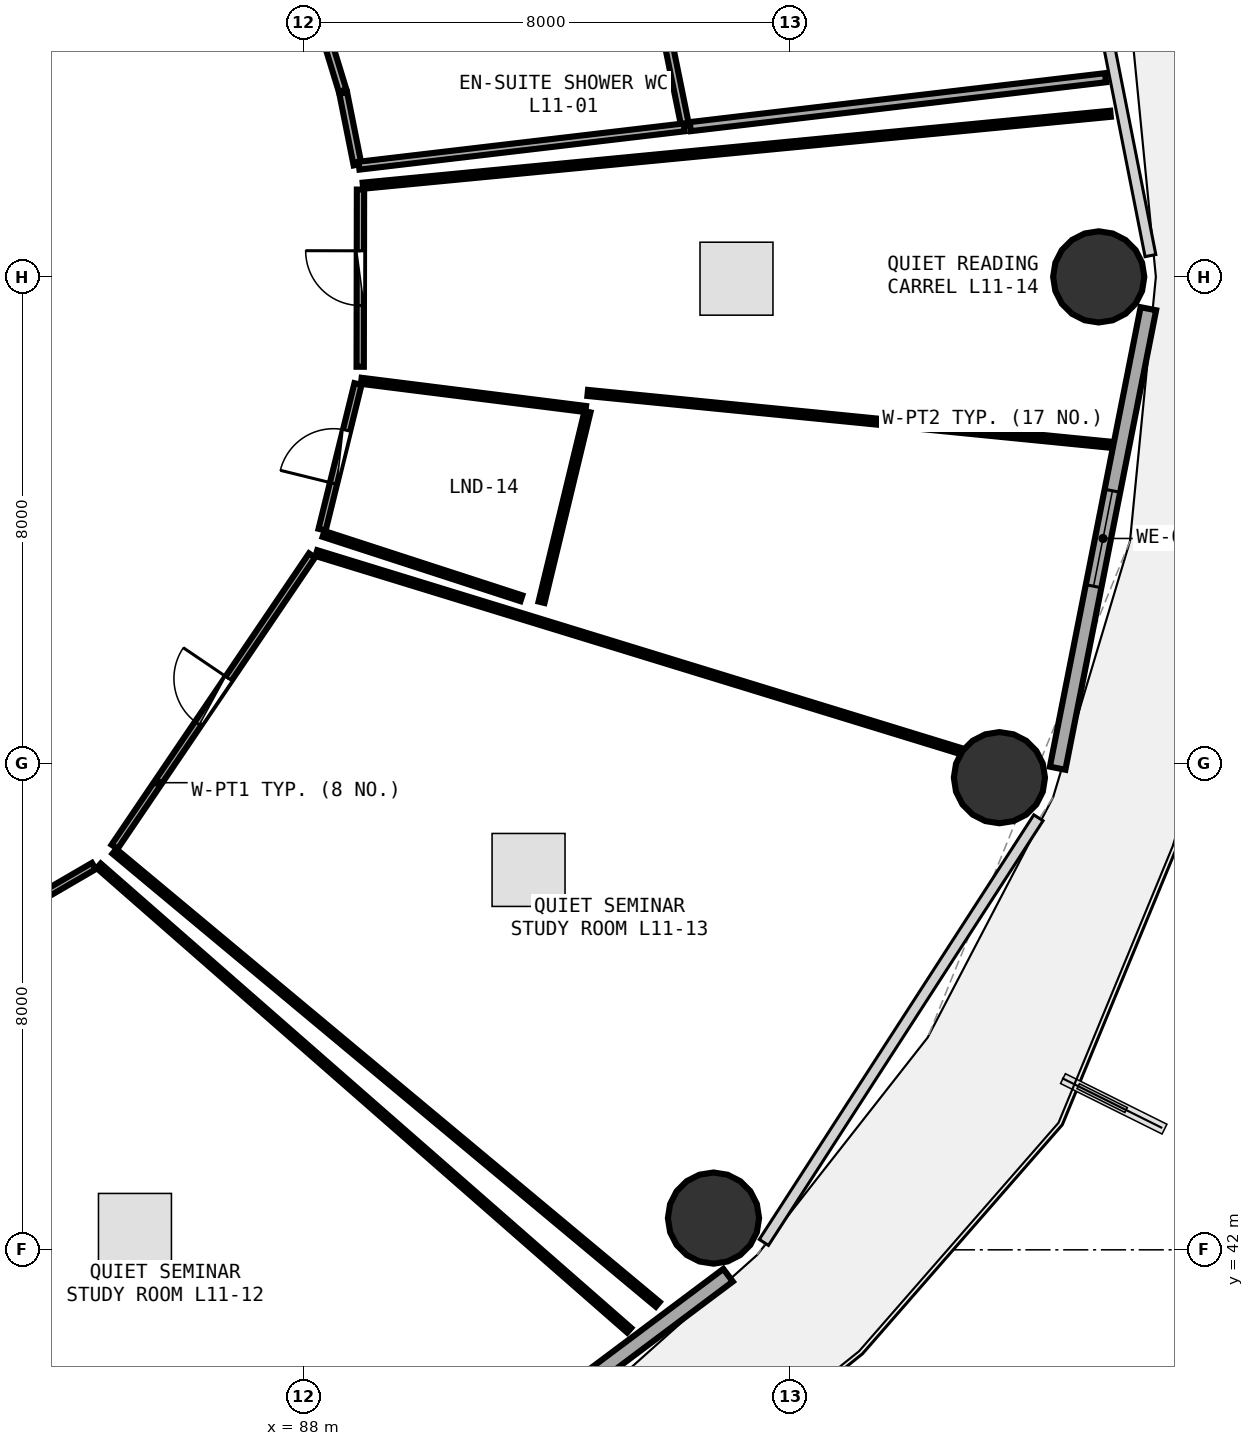
"""IFC4 building model, lengths in metres.
Left out: names, types, materials, properties, quantities, classifications, styles, units other than length and angle.
Written with IfcOpenShell. Run it as: python <this file> out.ifc"""

import sys

from ifc_helpers import new_model, si_unit, direction, frame, frame_2d, origin, origin_2d, place, context, subcontext, project, spatial, rectangle, circle, extrude, element, fill, save


model = new_model("IFC4")
c1 = context("Model", 3, precision=1e-05, world=origin(), true_north=direction((0.0, 1.0)))
c2 = subcontext(c1, "Body", "Model", "MODEL_VIEW")
j1 = project(units=[si_unit("LENGTHUNIT", "METRE"), si_unit("PLANEANGLEUNIT", "RADIAN")], contexts=[c1])
p1 = place(None, origin())
s1 = spatial("IfcSite", under=j1, at=p1, CompositionType="ELEMENT")
p2 = place(p1, origin())
s2 = spatial("IfcBuilding", under=s1, at=p2, CompositionType="ELEMENT")
p3 = place(p2, frame((0.0, 0.0, 45.0)))
s3 = spatial("IfcBuildingStorey", under=s2, at=p3, CompositionType="ELEMENT", Elevation=45.0)
for number, where, z_axis, x_axis in (
    (1, (101.08, 58.0, 0.0), (0.0, 0.0, 1.0), (1.0, 0.0, 0.0)),
    (2, (94.744, 42.522, 0.0), (0.0, 0.0, 1.0), (1.0, 0.0, 0.0)),
    (3, (99.447, 49.764, 0.0), (0.0, 0.0, 1.0), (1.0, 0.0, 0.0)),
):
    element("IfcColumn", number, at=place(p3, frame(where, z_axis=z_axis, x_axis=x_axis)), inside=s3, PredefinedType="COLUMN", context=c2, shape_type="SweptSolid", body=[
        extrude(circle(Radius=0.75, at=origin_2d()), origin(), (0.0, 0.0, 1.0), 3.75),
    ])
p4 = place(p3, frame((88.349, 36.611, 0.0), z_axis=(0.0, 0.0, 1.0), x_axis=(0.80030733173, 0.599590005569, 0.0)))
e4 = element("IfcWall", 4, at=p4, inside=s3, PredefinedType="SOLIDWALL", context=c2, shape_type="SweptSolid", body=[
    extrude(rectangle(XDim=8.291, YDim=0.26, at=frame_2d((4.145, 0.0))), origin(), (0.0, 0.0, 1.0), 3.475),
])
p5 = place(p4, frame((3.345, 0.0, 0.85)))
e5 = element("IfcOpeningElement", 5, at=p5, cuts=e4, PredefinedType="OPENING", context=c2, shape_type="SweptSolid", body=[
    extrude(rectangle(XDim=1.6, YDim=1.45, at=frame_2d((0.8, 0.725))), frame((0.0, 0.14, 0.0), z_axis=(0.0, -1.0, 0.0), x_axis=(1.0, 0.0, 0.0)), (0.0, 0.0, 1.0), 0.28),
])
p6 = place(p3, frame((100.404, 49.92, 0.0), z_axis=(0.0, 0.0, 1.0), x_axis=(0.193726159581, 0.98105564322, 0.0)))
e6 = element("IfcWall", 6, at=p6, inside=s3, PredefinedType="SOLIDWALL", context=c2, shape_type="SweptSolid", body=[
    extrude(rectangle(XDim=7.703, YDim=0.26, at=frame_2d((3.851, 0.0))), origin(), (0.0, 0.0, 1.0), 3.475),
])
p7 = place(p6, frame((3.051, 0.0, 0.85)))
e7 = element("IfcOpeningElement", 7, at=p7, cuts=e6, PredefinedType="OPENING", context=c2, shape_type="SweptSolid", body=[
    extrude(rectangle(XDim=1.6, YDim=1.45, at=frame_2d((0.8, 0.725))), frame((0.0, 0.14, 0.0), z_axis=(0.0, -1.0, 0.0), x_axis=(1.0, 0.0, 0.0)), (0.0, 0.0, 1.0), 0.28),
])
p8 = place(p3, frame((79.33, 45.268, 0.0), z_axis=(0.0, 0.0, 1.0), x_axis=(0.864061520755, 0.503386221852, 0.0)))
e8 = element("IfcWall", 8, at=p8, inside=s3, PredefinedType="PARTITIONING", context=c2, shape_type="SweptSolid", body=[
    extrude(rectangle(XDim=6.044, YDim=0.12, at=frame_2d((3.022, 0.0))), origin(), (0.0, 0.0, 1.0), 2.875),
])
p9 = place(p8, frame((2.572, 0.0, 0.0)))
e9 = element("IfcOpeningElement", 9, at=p9, cuts=e8, PredefinedType="OPENING", context=c2, shape_type="SweptSolid", body=[
    extrude(rectangle(XDim=0.9, YDim=2.08, at=frame_2d((0.45, 1.04))), frame((0.0, 0.07, 0.0), z_axis=(0.0, -1.0, 0.0), x_axis=(1.0, 0.0, 0.0)), (0.0, 0.0, 1.0), 0.14),
])
p10 = place(p3, frame((84.895, 48.628, 0.0), z_axis=(0.0, 0.0, 1.0), x_axis=(0.560933949984, 0.827860558159, 0.0)))
e10 = element("IfcWall", 10, at=p10, inside=s3, PredefinedType="PARTITIONING", context=c2, shape_type="SweptSolid", body=[
    extrude(rectangle(XDim=5.788, YDim=0.12, at=frame_2d((2.894, 0.0))), origin(), (0.0, 0.0, 1.0), 2.875),
])
p11 = place(p10, frame((2.444, 0.0, 0.0)))
e11 = element("IfcOpeningElement", 11, at=p11, cuts=e10, PredefinedType="OPENING", context=c2, shape_type="SweptSolid", body=[
    extrude(rectangle(XDim=0.9, YDim=2.08, at=frame_2d((0.45, 1.04))), frame((0.0, 0.07, 0.0), z_axis=(0.0, -1.0, 0.0), x_axis=(1.0, 0.0, 0.0)), (0.0, 0.0, 1.0), 0.14),
])
p12 = place(p3, frame((88.307, 53.843, 0.0), z_axis=(0.0, 0.0, 1.0), x_axis=(0.239366536705, 0.970929277088, 0.0)))
e12 = element("IfcWall", 12, at=p12, inside=s3, PredefinedType="PARTITIONING", context=c2, shape_type="SweptSolid", body=[
    extrude(rectangle(XDim=2.466, YDim=0.12, at=frame_2d((1.233, 0.0))), origin(), (0.0, 0.0, 1.0), 3.48),
])
p13 = place(p12, frame((0.783, 0.0, 0.0)))
e13 = element("IfcOpeningElement", 13, at=p13, cuts=e12, PredefinedType="OPENING", context=c2, shape_type="SweptSolid", body=[
    extrude(rectangle(XDim=0.9, YDim=2.08, at=frame_2d((0.45, 1.04))), frame((0.0, 0.07, 0.0), z_axis=(0.0, -1.0, 0.0), x_axis=(1.0, 0.0, 0.0)), (0.0, 0.0, 1.0), 0.14),
])
p14 = place(p3, frame((88.934, 56.522, 0.0), z_axis=(0.0, 0.0, 1.0), x_axis=(0.001675600865, 0.99999859618, 0.0)))
e14 = element("IfcWall", 14, at=p14, inside=s3, PredefinedType="PARTITIONING", context=c2, shape_type="SweptSolid", body=[
    extrude(rectangle(XDim=2.914, YDim=0.12, at=frame_2d((1.457, 0.0))), origin(), (0.0, 0.0, 1.0), 2.875),
])
p15 = place(p14, frame((1.007, 0.0, 0.0)))
e15 = element("IfcOpeningElement", 15, at=p15, cuts=e14, PredefinedType="OPENING", context=c2, shape_type="SweptSolid", body=[
    extrude(rectangle(XDim=0.9, YDim=2.08, at=frame_2d((0.45, 1.04))), frame((0.0, 0.07, 0.0), z_axis=(0.0, -1.0, 0.0), x_axis=(1.0, 0.0, 0.0)), (0.0, 0.0, 1.0), 0.14),
])
p16 = place(p3, frame((88.89, 59.846, 0.0), z_axis=(0.0, 0.0, 1.0), x_axis=(-0.195959765133, 0.980611936726, 0.0)))
e16 = element("IfcWall", 16, at=p16, inside=s3, PredefinedType="PLUMBINGWALL", context=c2, shape_type="SweptSolid", body=[
    extrude(rectangle(XDim=1.201, YDim=0.13, at=frame_2d((0.601, 0.0))), origin(), (0.0, 0.0, 1.0), 3.48),
])
p17 = place(p3, frame((88.645, 61.062, 0.0), z_axis=(0.0, 0.0, 1.0), x_axis=(-0.292804953119, 0.956172191307, 0.0)))
e17 = element("IfcWall", 17, at=p17, inside=s3, PredefinedType="PLUMBINGWALL", context=c2, shape_type="SweptSolid", body=[
    extrude(rectangle(XDim=1.206, YDim=0.13, at=frame_2d((0.603, 0.0))), origin(), (0.0, 0.0, 1.0), 3.48),
])
p18 = place(p3, frame((93.955, 62.079, 0.0), z_axis=(0.0, 0.0, 1.0), x_axis=(0.198619685617, -0.980076640108, 0.0)))
e18 = element("IfcWall", 18, at=p18, inside=s3, PredefinedType="PLUMBINGWALL", context=c2, shape_type="SweptSolid", body=[
    extrude(rectangle(XDim=1.631, YDim=0.13, at=frame_2d((0.815, 0.0))), origin(), (0.0, 0.0, 1.0), 3.48),
])
p19 = place(p3, frame((94.263, 60.459, 0.0), z_axis=(0.0, 0.0, 1.0), x_axis=(-0.993128310231, -0.117030591804, 0.0)))
e19 = element("IfcWall", 19, at=p19, inside=s3, PredefinedType="PLUMBINGWALL", context=c2, shape_type="SweptSolid", body=[
    extrude(rectangle(XDim=5.386, YDim=0.13, at=frame_2d((2.693, 0.0))), origin(), (0.0, 0.0, 1.0), 3.175),
])
p20 = place(p3, frame((101.192, 61.275, 0.0), z_axis=(0.0, 0.0, 1.0), x_axis=(-0.993130233211, -0.117014272133, 0.0)))
e20 = element("IfcWall", 20, at=p20, inside=s3, PredefinedType="PARTITIONING", context=c2, shape_type="SweptSolid", body=[
    extrude(rectangle(XDim=6.877, YDim=0.15, at=frame_2d((3.438, 0.0))), origin(), (0.0, 0.0, 1.0), 2.875),
])
p21 = place(p3, frame((84.634, 48.315, 0.0), z_axis=(0.0, 0.0, 1.0), x_axis=(0.752403187404, -0.658702849231, 0.0)))
e21 = element("IfcWall", 21, at=p21, inside=s3, PredefinedType="PARTITIONING", context=c2, shape_type="SweptSolid", body=[
    extrude(rectangle(XDim=11.595, YDim=0.1, at=frame_2d((5.797, 0.0))), origin(), (0.0, 0.0, 1.0), 2.875),
])
p22 = place(p3, frame((88.213, 53.457, 0.0), z_axis=(0.0, 0.0, 1.0), x_axis=(0.955941269752, -0.29355798198, 0.0)))
e22 = element("IfcWall", 22, at=p22, inside=s3, PredefinedType="PARTITIONING", context=c2, shape_type="SweptSolid", body=[
    extrude(rectangle(XDim=11.083, YDim=0.1, at=frame_2d((5.542, 0.0))), origin(), (0.0, 0.0, 1.0), 3.175),
])
p23 = place(p3, frame((93.827, 41.104, 0.0), z_axis=(0.0, 0.0, 1.0), x_axis=(-0.768116338219, 0.640310308336, 0.0)))
e23 = element("IfcWall", 23, at=p23, inside=s3, PredefinedType="PARTITIONING", context=c2, shape_type="SweptSolid", body=[
    extrude(rectangle(XDim=11.633, YDim=0.1, at=frame_2d((5.817, 0.0))), origin(), (0.0, 0.0, 1.0), 2.875),
])
p24 = place(p3, frame((88.952, 56.291, 0.0), z_axis=(0.0, 0.0, 1.0), x_axis=(0.992185717147, -0.124769798789, 0.0)))
e24 = element("IfcWall", 24, at=p24, inside=s3, PredefinedType="PARTITIONING", context=c2, shape_type="SweptSolid", body=[
    extrude(rectangle(XDim=3.72, YDim=0.1, at=frame_2d((1.86, 0.0))), origin(), (0.0, 0.0, 1.0), 3.235),
])
p25 = place(p3, frame((92.673, 55.783, 0.0), z_axis=(0.0, 0.0, 1.0), x_axis=(-0.234509762348, -0.97211376462, 0.0)))
e25 = element("IfcWall", 25, at=p25, inside=s3, PredefinedType="PARTITIONING", context=c2, shape_type="SweptSolid", body=[
    extrude(rectangle(XDim=3.224, YDim=0.1, at=frame_2d((1.612, 0.0))), origin(), (0.0, 0.0, 1.0), 3.48),
])
p26 = place(p3, frame((91.585, 52.715, 0.0), z_axis=(0.0, 0.0, 1.0), x_axis=(-0.950990540972, 0.309219971834, 0.0)))
e26 = element("IfcWall", 26, at=p26, inside=s3, PredefinedType="PARTITIONING", context=c2, shape_type="SweptSolid", body=[
    extrude(rectangle(XDim=3.422, YDim=0.1, at=frame_2d((1.711, 0.0))), origin(), (0.0, 0.0, 1.0), 3.235),
])
p27 = place(p3, frame((88.979, 59.5, 0.0), z_axis=(0.0, 0.0, 1.0), x_axis=(0.995408087514, 0.095722198638, 0.0)))
e27 = element("IfcWall", 27, at=p27, inside=s3, PredefinedType="PARTITIONING", context=c2, shape_type="SweptSolid", body=[
    extrude(rectangle(XDim=12.352, YDim=0.1, at=frame_2d((6.176, 0.0))), origin(), (0.0, 0.0, 1.0), 2.875),
])
p28 = place(p3, frame((101.264, 55.241, 0.0), z_axis=(0.0, 0.0, 1.0), x_axis=(-0.995131682946, 0.098554216532, 0.0)))
e28 = element("IfcWall", 28, at=p28, inside=s3, PredefinedType="PARTITIONING", context=c2, shape_type="SweptSolid", body=[
    extrude(rectangle(XDim=8.631, YDim=0.1, at=frame_2d((4.315, 0.0))), origin(), (0.0, 0.0, 1.0), 2.875),
])
p29 = place(p7, origin())
e29 = element("IfcWindow", 29, at=p29, inside=s3, PartitioningType="SINGLE_PANEL", PredefinedType="WINDOW", context=c2, shape_type="SweptSolid", body=[
    extrude(rectangle(XDim=1.6, YDim=1.45, at=frame_2d((0.8, 0.725))), frame((0.0, 0.03, 0.0), z_axis=(0.0, -1.0, 0.0), x_axis=(1.0, 0.0, 0.0)), (0.0, 0.0, 1.0), 0.06),
])
fill(e7, e29)
p30 = place(p11, origin())
e30 = element("IfcDoor", 30, at=p30, inside=s3, OperationType="SINGLE_SWING_RIGHT", PredefinedType="DOOR", context=c2, shape_type="SweptSolid", body=[
    extrude(rectangle(XDim=0.9, YDim=2.08, at=frame_2d((0.45, 1.04))), frame((0.0, 0.025, 0.0), z_axis=(0.0, -1.0, 0.0), x_axis=(1.0, 0.0, 0.0)), (0.0, 0.0, 1.0), 0.05),
])
fill(e11, e30)
p31 = place(p13, origin())
e31 = element("IfcDoor", 31, at=p31, inside=s3, OperationType="SINGLE_SWING_LEFT", PredefinedType="DOOR", context=c2, shape_type="SweptSolid", body=[
    extrude(rectangle(XDim=0.9, YDim=2.08, at=frame_2d((0.45, 1.04))), frame((0.0, 0.025, 0.0), z_axis=(0.0, -1.0, 0.0), x_axis=(1.0, 0.0, 0.0)), (0.0, 0.0, 1.0), 0.05),
])
fill(e13, e31)
p32 = place(p15, origin())
e32 = element("IfcDoor", 32, at=p32, inside=s3, OperationType="SINGLE_SWING_RIGHT", PredefinedType="DOOR", context=c2, shape_type="SweptSolid", body=[
    extrude(rectangle(XDim=0.9, YDim=2.08, at=frame_2d((0.45, 1.04))), frame((0.0, 0.025, 0.0), z_axis=(0.0, -1.0, 0.0), x_axis=(1.0, 0.0, 0.0)), (0.0, 0.0, 1.0), 0.05),
])
fill(e15, e32)
save(model, sys.argv[1])
